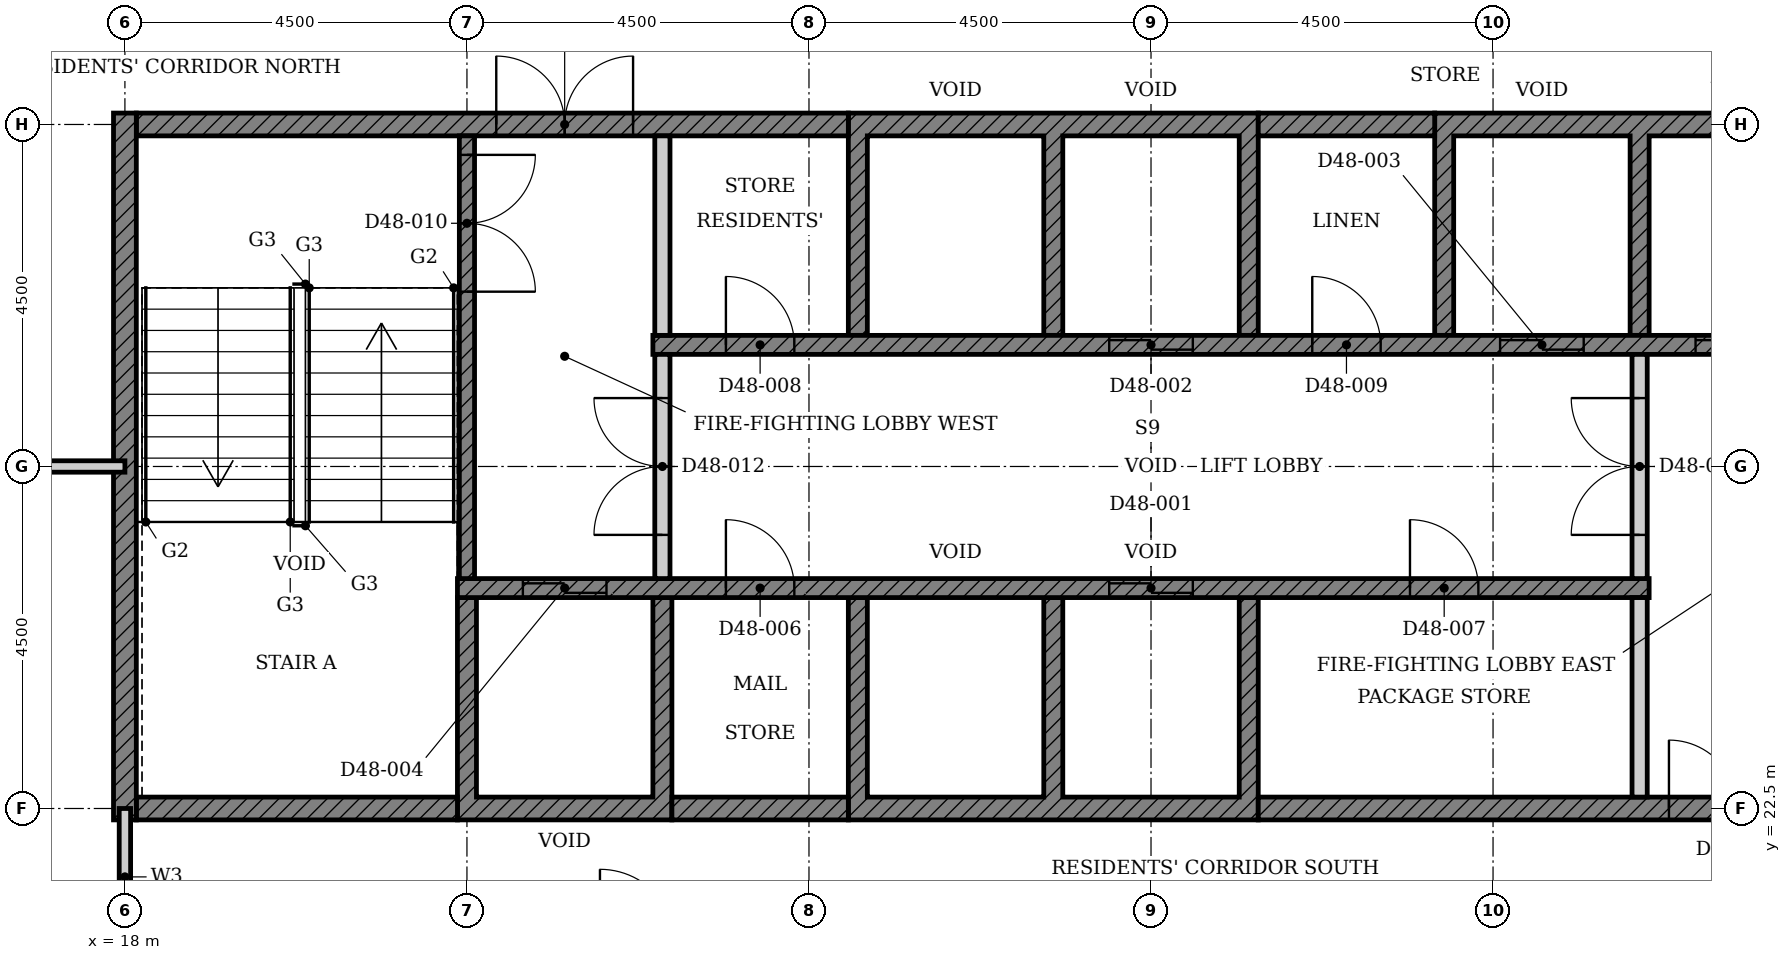
"""IFC4 building model, lengths in metres.
Left out: names, types, materials, properties, quantities, classifications, styles, units other than length and angle.
Written with IfcOpenShell. Run it as: python <this file> out.ifc"""

import sys

from ifc_helpers import new_model, si_unit, direction, frame, frame_2d, origin, place, context, subcontext, project, spatial, polyline, rectangle, outline, extrude, element, fill, save


model = new_model("IFC4")
c1 = context("Model", 3, precision=1e-05, world=origin(), true_north=direction((0.0, 1.0)))
c2 = subcontext(c1, "Body", "Model", "MODEL_VIEW")
j1 = project(units=[si_unit("LENGTHUNIT", "METRE"), si_unit("PLANEANGLEUNIT", "RADIAN")], contexts=[c1])
p1 = place(None, origin())
s1 = spatial("IfcSite", under=j1, at=p1, CompositionType="ELEMENT")
p2 = place(p1, origin())
s2 = spatial("IfcBuilding", under=s1, at=p2, CompositionType="ELEMENT")
p3 = place(p2, frame((0.0, 0.0, 192.4)))
s3 = spatial("IfcBuildingStorey", under=s2, at=p3, CompositionType="ELEMENT", Elevation=192.4)
p4 = place(p3, origin())
e1 = element("IfcWall", 1, at=p4, inside=s3, PredefinedType="SHEAR", context=c2, shape_type="SweptSolid", body=[
    extrude(outline(polyline([(22.375, 22.35), (25.197, 22.35), (25.197, 25.275), (24.947, 25.275), (24.947, 22.65), (22.625, 22.65), (22.625, 25.275), (22.375, 25.275), (22.375, 22.35)])), origin(), (0.0, 0.0, 1.0), 3.4),
])
p5 = place(p3, origin())
e2 = element("IfcWall", 2, at=p5, inside=s3, PredefinedType="SHEAR", context=c2, shape_type="SweptSolid", body=[
    extrude(outline(polyline([(27.518, 22.35), (32.911, 22.35), (32.911, 25.275), (32.661, 25.275), (32.661, 22.65), (30.339, 22.65), (30.339, 25.275), (30.089, 25.275), (30.089, 22.65), (27.768, 22.65), (27.768, 25.275), (27.518, 25.275), (27.518, 22.35)])), origin(), (0.0, 0.0, 1.0), 3.4),
])
p6 = place(p3, origin())
e3 = element("IfcWall", 3, at=p6, inside=s3, PredefinedType="SHEAR", context=c2, shape_type="SweptSolid", body=[
    extrude(outline(polyline([(27.518, 28.725), (27.768, 28.725), (27.768, 31.35), (30.089, 31.35), (30.089, 28.725), (30.339, 28.725), (30.339, 31.35), (32.661, 31.35), (32.661, 28.725), (32.911, 28.725), (32.911, 31.65), (27.518, 31.65), (27.518, 28.725)])), origin(), (0.0, 0.0, 1.0), 3.4),
])
p7 = place(p3, origin())
e4 = element("IfcWall", 4, at=p7, inside=s3, PredefinedType="SHEAR", context=c2, shape_type="SweptSolid", body=[
    extrude(outline(polyline([(35.232, 28.725), (35.482, 28.725), (35.482, 31.35), (37.803, 31.35), (37.803, 28.725), (38.053, 28.725), (38.053, 31.35), (40.375, 31.35), (40.375, 28.725), (40.625, 28.725), (40.625, 31.65), (35.232, 31.65), (35.232, 28.725)])), origin(), (0.0, 0.0, 1.0), 3.4),
])
p8 = place(p3, frame((18.15, 22.5, 0.0), z_axis=(0.0, 0.0, 1.0), x_axis=(1.0, 0.0, 0.0)))
e5 = element("IfcWall", 5, at=p8, inside=s3, PredefinedType="SHEAR", context=c2, shape_type="SweptSolid", body=[
    extrude(rectangle(XDim=4.225, YDim=0.3, at=frame_2d((2.113, 0.0))), origin(), (0.0, 0.0, 1.0), 3.4),
])
p9 = place(p3, frame((25.197, 22.5, 0.0), z_axis=(0.0, 0.0, 1.0), x_axis=(1.0, 0.0, 0.0)))
e6 = element("IfcWall", 6, at=p9, inside=s3, PredefinedType="SHEAR", context=c2, shape_type="SweptSolid", body=[
    extrude(rectangle(XDim=2.321, YDim=0.3, at=frame_2d((1.161, 0.0))), origin(), (0.0, 0.0, 1.0), 3.4),
])
p10 = place(p3, frame((32.911, 22.5, 0.0), z_axis=(0.0, 0.0, 1.0), x_axis=(1.0, 0.0, 0.0)))
e7 = element("IfcWall", 7, at=p10, inside=s3, PredefinedType="SHEAR", context=c2, shape_type="SweptSolid", body=[
    extrude(rectangle(XDim=11.939, YDim=0.3, at=frame_2d((5.97, 0.0))), origin(), (0.0, 0.0, 1.0), 3.4),
])
p11 = place(p10, frame((5.404, 0.0, 0.0)))
e8 = element("IfcOpeningElement", 8, at=p11, cuts=e7, PredefinedType="OPENING", context=c2, shape_type="SweptSolid", body=[
    extrude(rectangle(XDim=1.8, YDim=2.1, at=frame_2d((0.9, 1.05))), frame((0.0, 0.16, 0.0), z_axis=(0.0, -1.0, 0.0), x_axis=(1.0, 0.0, 0.0)), (0.0, 0.0, 1.0), 0.32),
])
p12 = place(p3, frame((18.15, 31.5, 0.0), z_axis=(0.0, 0.0, 1.0), x_axis=(1.0, 0.0, 0.0)))
e9 = element("IfcWall", 9, at=p12, inside=s3, PredefinedType="SHEAR", context=c2, shape_type="SweptSolid", body=[
    extrude(rectangle(XDim=9.368, YDim=0.3, at=frame_2d((4.684, 0.0))), origin(), (0.0, 0.0, 1.0), 3.4),
])
p13 = place(p12, frame((4.736, 0.0, 0.0)))
e10 = element("IfcOpeningElement", 10, at=p13, cuts=e9, PredefinedType="OPENING", context=c2, shape_type="SweptSolid", body=[
    extrude(rectangle(XDim=1.8, YDim=2.1, at=frame_2d((0.9, 1.05))), frame((0.0, 0.16, 0.0), z_axis=(0.0, -1.0, 0.0), x_axis=(1.0, 0.0, 0.0)), (0.0, 0.0, 1.0), 0.32),
])
p14 = place(p3, frame((32.911, 31.5, 0.0), z_axis=(0.0, 0.0, 1.0), x_axis=(1.0, 0.0, 0.0)))
e11 = element("IfcWall", 11, at=p14, inside=s3, PredefinedType="SHEAR", context=c2, shape_type="SweptSolid", body=[
    extrude(rectangle(XDim=2.322, YDim=0.3, at=frame_2d((1.161, 0.0))), origin(), (0.0, 0.0, 1.0), 3.4),
])
p15 = place(p3, frame((18.0, 22.35, 0.0), z_axis=(0.0, 0.0, 1.0), x_axis=(0.0, 1.0, 0.0)))
e12 = element("IfcWall", 12, at=p15, inside=s3, PredefinedType="SHEAR", context=c2, shape_type="SweptSolid", body=[
    extrude(rectangle(XDim=9.3, YDim=0.3, at=frame_2d((4.65, 0.0))), origin(), (0.0, 0.0, 1.0), 3.4),
])
p16 = place(p3, frame((22.375, 25.4, 0.0), z_axis=(0.0, 0.0, 1.0), x_axis=(1.0, 0.0, 0.0)))
e13 = element("IfcWall", 13, at=p16, inside=s3, PredefinedType="SHEAR", context=c2, shape_type="SweptSolid", body=[
    extrude(rectangle(XDim=15.678, YDim=0.25, at=frame_2d((7.839, 0.0))), origin(), (0.0, 0.0, 1.0), 3.4),
])
p17 = place(p16, frame((8.575, 0.0, 0.0)))
e14 = element("IfcOpeningElement", 14, at=p17, cuts=e13, PredefinedType="OPENING", context=c2, shape_type="SweptSolid", body=[
    extrude(rectangle(XDim=1.1, YDim=2.1, at=frame_2d((0.55, 1.05))), frame((0.0, 0.135, 0.0), z_axis=(0.0, -1.0, 0.0), x_axis=(1.0, 0.0, 0.0)), (0.0, 0.0, 1.0), 0.27),
])
p18 = place(p16, frame((0.861, 0.0, 0.0)))
e15 = element("IfcOpeningElement", 15, at=p18, cuts=e13, PredefinedType="OPENING", context=c2, shape_type="SweptSolid", body=[
    extrude(rectangle(XDim=1.1, YDim=2.1, at=frame_2d((0.55, 1.05))), frame((0.0, 0.135, 0.0), z_axis=(0.0, -1.0, 0.0), x_axis=(1.0, 0.0, 0.0)), (0.0, 0.0, 1.0), 0.27),
])
p19 = place(p16, frame((3.532, 0.0, 0.0)))
e16 = element("IfcOpeningElement", 16, at=p19, cuts=e13, PredefinedType="OPENING", context=c2, shape_type="SweptSolid", body=[
    extrude(rectangle(XDim=0.9, YDim=2.1, at=frame_2d((0.45, 1.05))), frame((0.0, 0.135, 0.0), z_axis=(0.0, -1.0, 0.0), x_axis=(1.0, 0.0, 0.0)), (0.0, 0.0, 1.0), 0.27),
])
p20 = place(p16, frame((12.532, 0.0, 0.0)))
e17 = element("IfcOpeningElement", 17, at=p20, cuts=e13, PredefinedType="OPENING", context=c2, shape_type="SweptSolid", body=[
    extrude(rectangle(XDim=0.9, YDim=2.1, at=frame_2d((0.45, 1.05))), frame((0.0, 0.135, 0.0), z_axis=(0.0, -1.0, 0.0), x_axis=(1.0, 0.0, 0.0)), (0.0, 0.0, 1.0), 0.27),
])
p21 = place(p3, frame((24.947, 28.6, 0.0), z_axis=(0.0, 0.0, 1.0), x_axis=(1.0, 0.0, 0.0)))
e18 = element("IfcWall", 18, at=p21, inside=s3, PredefinedType="SHEAR", context=c2, shape_type="SweptSolid", body=[
    extrude(rectangle(XDim=15.678, YDim=0.25, at=frame_2d((7.839, 0.0))), origin(), (0.0, 0.0, 1.0), 3.4),
])
p22 = place(p21, frame((6.004, 0.0, 0.0)))
e19 = element("IfcOpeningElement", 19, at=p22, cuts=e18, PredefinedType="OPENING", context=c2, shape_type="SweptSolid", body=[
    extrude(rectangle(XDim=1.1, YDim=2.1, at=frame_2d((0.55, 1.05))), frame((0.0, 0.135, 0.0), z_axis=(0.0, -1.0, 0.0), x_axis=(1.0, 0.0, 0.0)), (0.0, 0.0, 1.0), 0.27),
])
p23 = place(p21, frame((11.146, 0.0, 0.0)))
e20 = element("IfcOpeningElement", 20, at=p23, cuts=e18, PredefinedType="OPENING", context=c2, shape_type="SweptSolid", body=[
    extrude(rectangle(XDim=1.1, YDim=2.1, at=frame_2d((0.55, 1.05))), frame((0.0, 0.135, 0.0), z_axis=(0.0, -1.0, 0.0), x_axis=(1.0, 0.0, 0.0)), (0.0, 0.0, 1.0), 0.27),
])
p24 = place(p21, frame((13.718, 0.0, 0.0)))
e21 = element("IfcOpeningElement", 21, at=p24, cuts=e18, PredefinedType="OPENING", context=c2, shape_type="SweptSolid", body=[
    extrude(rectangle(XDim=1.1, YDim=2.1, at=frame_2d((0.55, 1.05))), frame((0.0, 0.135, 0.0), z_axis=(0.0, -1.0, 0.0), x_axis=(1.0, 0.0, 0.0)), (0.0, 0.0, 1.0), 0.27),
])
p25 = place(p21, frame((0.961, 0.0, 0.0)))
e22 = element("IfcOpeningElement", 22, at=p25, cuts=e18, PredefinedType="OPENING", context=c2, shape_type="SweptSolid", body=[
    extrude(rectangle(XDim=0.9, YDim=2.1, at=frame_2d((0.45, 1.05))), frame((0.0, 0.135, 0.0), z_axis=(0.0, -1.0, 0.0), x_axis=(1.0, 0.0, 0.0)), (0.0, 0.0, 1.0), 0.27),
])
p26 = place(p21, frame((8.675, 0.0, 0.0)))
e23 = element("IfcOpeningElement", 23, at=p26, cuts=e18, PredefinedType="OPENING", context=c2, shape_type="SweptSolid", body=[
    extrude(rectangle(XDim=0.9, YDim=2.1, at=frame_2d((0.45, 1.05))), frame((0.0, 0.135, 0.0), z_axis=(0.0, -1.0, 0.0), x_axis=(1.0, 0.0, 0.0)), (0.0, 0.0, 1.0), 0.27),
])
for number, where, z_axis, x_axis in (
    (24, (37.928, 22.65, 0.0), (0.0, 0.0, 1.0), (0.0, 1.0, 0.0)),
    (25, (25.072, 28.725, 0.0), (0.0, 0.0, 1.0), (0.0, 1.0, 0.0)),
):
    element("IfcWall", number, at=place(p3, frame(where, z_axis=z_axis, x_axis=x_axis)), inside=s3, PredefinedType="PARTITIONING", context=c2, shape_type="SweptSolid", body=[
        extrude(rectangle(XDim=2.625, YDim=0.2, at=frame_2d((1.312, 0.0))), origin(), (0.0, 0.0, 1.0), 3.4),
    ])
p27 = place(p3, frame((22.5, 31.35, 0.0), z_axis=(0.0, 0.0, 1.0), x_axis=(0.0, -1.0, 0.0)))
e26 = element("IfcWall", 26, at=p27, inside=s3, PredefinedType="SHEAR", context=c2, shape_type="SweptSolid", body=[
    extrude(rectangle(XDim=5.825, YDim=0.2, at=frame_2d((2.913, 0.0))), origin(), (0.0, 0.0, 1.0), 3.4),
])
p28 = place(p27, frame((0.25, 0.0, 0.0)))
e27 = element("IfcOpeningElement", 27, at=p28, cuts=e26, PredefinedType="OPENING", context=c2, shape_type="SweptSolid", body=[
    extrude(rectangle(XDim=1.8, YDim=2.1, at=frame_2d((0.9, 1.05))), frame((0.0, 0.11, 0.0), z_axis=(0.0, -1.0, 0.0), x_axis=(1.0, 0.0, 0.0)), (0.0, 0.0, 1.0), 0.22),
])
p29 = place(p3, frame((25.072, 25.525, 0.0), z_axis=(0.0, 0.0, 1.0), x_axis=(0.0, 1.0, 0.0)))
e28 = element("IfcWall", 28, at=p29, inside=s3, PredefinedType="PARTITIONING", context=c2, shape_type="SweptSolid", body=[
    extrude(rectangle(XDim=2.95, YDim=0.2, at=frame_2d((1.475, 0.0))), origin(), (0.0, 0.0, 1.0), 3.4),
])
p30 = place(p29, frame((0.575, 0.0, 0.0)))
e29 = element("IfcOpeningElement", 29, at=p30, cuts=e28, PredefinedType="OPENING", context=c2, shape_type="SweptSolid", body=[
    extrude(rectangle(XDim=1.8, YDim=2.1, at=frame_2d((0.9, 1.05))), frame((0.0, 0.11, 0.0), z_axis=(0.0, -1.0, 0.0), x_axis=(1.0, 0.0, 0.0)), (0.0, 0.0, 1.0), 0.22),
])
p31 = place(p3, frame((37.928, 25.525, 0.0), z_axis=(0.0, 0.0, 1.0), x_axis=(0.0, 1.0, 0.0)))
e30 = element("IfcWall", 30, at=p31, inside=s3, PredefinedType="PARTITIONING", context=c2, shape_type="SweptSolid", body=[
    extrude(rectangle(XDim=2.95, YDim=0.2, at=frame_2d((1.475, 0.0))), origin(), (0.0, 0.0, 1.0), 3.4),
])
p32 = place(p31, frame((0.575, 0.0, 0.0)))
e31 = element("IfcOpeningElement", 31, at=p32, cuts=e30, PredefinedType="OPENING", context=c2, shape_type="SweptSolid", body=[
    extrude(rectangle(XDim=1.8, YDim=2.1, at=frame_2d((0.9, 1.05))), frame((0.0, 0.11, 0.0), z_axis=(0.0, -1.0, 0.0), x_axis=(1.0, 0.0, 0.0)), (0.0, 0.0, 1.0), 0.22),
])
p33 = place(p3, frame((4.5, 27.0, 0.0), z_axis=(0.0, 0.0, 1.0), x_axis=(1.0, 0.0, 0.0)))
e32 = element("IfcWall", 32, at=p33, inside=s3, PredefinedType="PARTITIONING", context=c2, shape_type="SweptSolid", body=[
    extrude(rectangle(XDim=13.5, YDim=0.15, at=frame_2d((6.75, 0.0))), origin(), (0.0, 0.0, 1.0), 2.68),
])
p34 = place(p33, frame((5.35, 0.0, 0.0)))
e33 = element("IfcOpeningElement", 33, at=p34, cuts=e32, PredefinedType="OPENING", context=c2, shape_type="SweptSolid", body=[
    extrude(rectangle(XDim=1.0, YDim=2.1, at=frame_2d((0.5, 1.05))), frame((0.0, 0.085, 0.0), z_axis=(0.0, -1.0, 0.0), x_axis=(1.0, 0.0, 0.0)), (0.0, 0.0, 1.0), 0.17),
])
p35 = place(p3, frame((18.0, 20.7, 0.0), z_axis=(0.0, 0.0, 1.0), x_axis=(0.0, 1.0, 0.0)))
e34 = element("IfcWall", 34, at=p35, inside=s3, PredefinedType="PARTITIONING", context=c2, shape_type="SweptSolid", body=[
    extrude(rectangle(XDim=1.8, YDim=0.15, at=frame_2d((0.9, 0.0))), origin(), (0.0, 0.0, 1.0), 3.4),
])
p36 = place(p17, origin())
e35 = element("IfcDoor", 35, at=p36, inside=s3, OperationType="DOUBLE_DOOR_SLIDING", PredefinedType="DOOR", context=c2, shape_type="SweptSolid", body=[
    extrude(rectangle(XDim=1.1, YDim=2.1, at=frame_2d((0.55, 1.05))), frame((0.0, 0.025, 0.0), z_axis=(0.0, -1.0, 0.0), x_axis=(1.0, 0.0, 0.0)), (0.0, 0.0, 1.0), 0.05),
])
fill(e14, e35)
p37 = place(p22, origin())
e36 = element("IfcDoor", 36, at=p37, inside=s3, OperationType="DOUBLE_DOOR_SLIDING", PredefinedType="DOOR", context=c2, shape_type="SweptSolid", body=[
    extrude(rectangle(XDim=1.1, YDim=2.1, at=frame_2d((0.55, 1.05))), frame((0.0, 0.025, 0.0), z_axis=(0.0, -1.0, 0.0), x_axis=(1.0, 0.0, 0.0)), (0.0, 0.0, 1.0), 0.05),
])
fill(e19, e36)
p38 = place(p23, origin())
e37 = element("IfcDoor", 37, at=p38, inside=s3, OperationType="DOUBLE_DOOR_SLIDING", PredefinedType="DOOR", context=c2, shape_type="SweptSolid", body=[
    extrude(rectangle(XDim=1.1, YDim=2.1, at=frame_2d((0.55, 1.05))), frame((0.0, 0.025, 0.0), z_axis=(0.0, -1.0, 0.0), x_axis=(1.0, 0.0, 0.0)), (0.0, 0.0, 1.0), 0.05),
])
fill(e20, e37)
p39 = place(p18, origin())
e38 = element("IfcDoor", 38, at=p39, inside=s3, OperationType="DOUBLE_DOOR_SLIDING", PredefinedType="DOOR", context=c2, shape_type="SweptSolid", body=[
    extrude(rectangle(XDim=1.1, YDim=2.1, at=frame_2d((0.55, 1.05))), frame((0.0, 0.025, 0.0), z_axis=(0.0, -1.0, 0.0), x_axis=(1.0, 0.0, 0.0)), (0.0, 0.0, 1.0), 0.05),
])
fill(e15, e38)
p40 = place(p24, origin())
e39 = element("IfcDoor", 39, at=p40, inside=s3, OperationType="DOUBLE_DOOR_SLIDING", PredefinedType="DOOR", context=c2, shape_type="SweptSolid", body=[
    extrude(rectangle(XDim=1.1, YDim=2.1, at=frame_2d((0.55, 1.05))), frame((0.0, 0.025, 0.0), z_axis=(0.0, -1.0, 0.0), x_axis=(1.0, 0.0, 0.0)), (0.0, 0.0, 1.0), 0.05),
])
fill(e21, e39)
p41 = place(p19, origin())
e40 = element("IfcDoor", 40, at=p41, inside=s3, OperationType="SINGLE_SWING_LEFT", PredefinedType="DOOR", context=c2, shape_type="SweptSolid", body=[
    extrude(rectangle(XDim=0.9, YDim=2.1, at=frame_2d((0.45, 1.05))), frame((0.0, 0.025, 0.0), z_axis=(0.0, -1.0, 0.0), x_axis=(1.0, 0.0, 0.0)), (0.0, 0.0, 1.0), 0.05),
])
fill(e16, e40)
p42 = place(p20, origin())
e41 = element("IfcDoor", 41, at=p42, inside=s3, OperationType="SINGLE_SWING_LEFT", PredefinedType="DOOR", context=c2, shape_type="SweptSolid", body=[
    extrude(rectangle(XDim=0.9, YDim=2.1, at=frame_2d((0.45, 1.05))), frame((0.0, 0.025, 0.0), z_axis=(0.0, -1.0, 0.0), x_axis=(1.0, 0.0, 0.0)), (0.0, 0.0, 1.0), 0.05),
])
fill(e17, e41)
p43 = place(p25, origin())
e42 = element("IfcDoor", 42, at=p43, inside=s3, OperationType="SINGLE_SWING_LEFT", PredefinedType="DOOR", context=c2, shape_type="SweptSolid", body=[
    extrude(rectangle(XDim=0.9, YDim=2.1, at=frame_2d((0.45, 1.05))), frame((0.0, 0.025, 0.0), z_axis=(0.0, -1.0, 0.0), x_axis=(1.0, 0.0, 0.0)), (0.0, 0.0, 1.0), 0.05),
])
fill(e22, e42)
p44 = place(p26, origin())
e43 = element("IfcDoor", 43, at=p44, inside=s3, OperationType="SINGLE_SWING_LEFT", PredefinedType="DOOR", context=c2, shape_type="SweptSolid", body=[
    extrude(rectangle(XDim=0.9, YDim=2.1, at=frame_2d((0.45, 1.05))), frame((0.0, 0.025, 0.0), z_axis=(0.0, -1.0, 0.0), x_axis=(1.0, 0.0, 0.0)), (0.0, 0.0, 1.0), 0.05),
])
fill(e23, e43)
p45 = place(p28, origin())
e44 = element("IfcDoor", 44, at=p45, inside=s3, OperationType="DOUBLE_DOOR_SINGLE_SWING", PredefinedType="DOOR", context=c2, shape_type="SweptSolid", body=[
    extrude(rectangle(XDim=1.8, YDim=2.1, at=frame_2d((0.9, 1.05))), frame((0.0, 0.025, 0.0), z_axis=(0.0, -1.0, 0.0), x_axis=(1.0, 0.0, 0.0)), (0.0, 0.0, 1.0), 0.05),
])
fill(e27, e44)
p46 = place(p30, origin())
e45 = element("IfcDoor", 45, at=p46, inside=s3, OperationType="DOUBLE_DOOR_SINGLE_SWING", PredefinedType="DOOR", context=c2, shape_type="SweptSolid", body=[
    extrude(rectangle(XDim=1.8, YDim=2.1, at=frame_2d((0.9, 1.05))), frame((0.0, 0.025, 0.0), z_axis=(0.0, -1.0, 0.0), x_axis=(1.0, 0.0, 0.0)), (0.0, 0.0, 1.0), 0.05),
])
fill(e29, e45)
p47 = place(p32, origin())
e46 = element("IfcDoor", 46, at=p47, inside=s3, OperationType="DOUBLE_DOOR_SINGLE_SWING", PredefinedType="DOOR", context=c2, shape_type="SweptSolid", body=[
    extrude(rectangle(XDim=1.8, YDim=2.1, at=frame_2d((0.9, 1.05))), frame((0.0, 0.025, 0.0), z_axis=(0.0, -1.0, 0.0), x_axis=(1.0, 0.0, 0.0)), (0.0, 0.0, 1.0), 0.05),
])
fill(e31, e46)
p48 = place(p13, origin())
e47 = element("IfcDoor", 47, at=p48, inside=s3, OperationType="DOUBLE_DOOR_SINGLE_SWING", PredefinedType="DOOR", context=c2, shape_type="SweptSolid", body=[
    extrude(rectangle(XDim=1.8, YDim=2.1, at=frame_2d((0.9, 1.05))), frame((0.0, 0.025, 0.0), z_axis=(0.0, -1.0, 0.0), x_axis=(1.0, 0.0, 0.0)), (0.0, 0.0, 1.0), 0.05),
])
fill(e10, e47)
p49 = place(p11, origin())
e48 = element("IfcDoor", 48, at=p49, inside=s3, OperationType="DOUBLE_DOOR_SINGLE_SWING", PredefinedType="DOOR", context=c2, shape_type="SweptSolid", body=[
    extrude(rectangle(XDim=1.8, YDim=2.1, at=frame_2d((0.9, 1.05))), frame((0.0, 0.025, 0.0), z_axis=(0.0, -1.0, 0.0), x_axis=(1.0, 0.0, 0.0)), (0.0, 0.0, 1.0), 0.05),
])
fill(e8, e48)
save(model, sys.argv[1])
